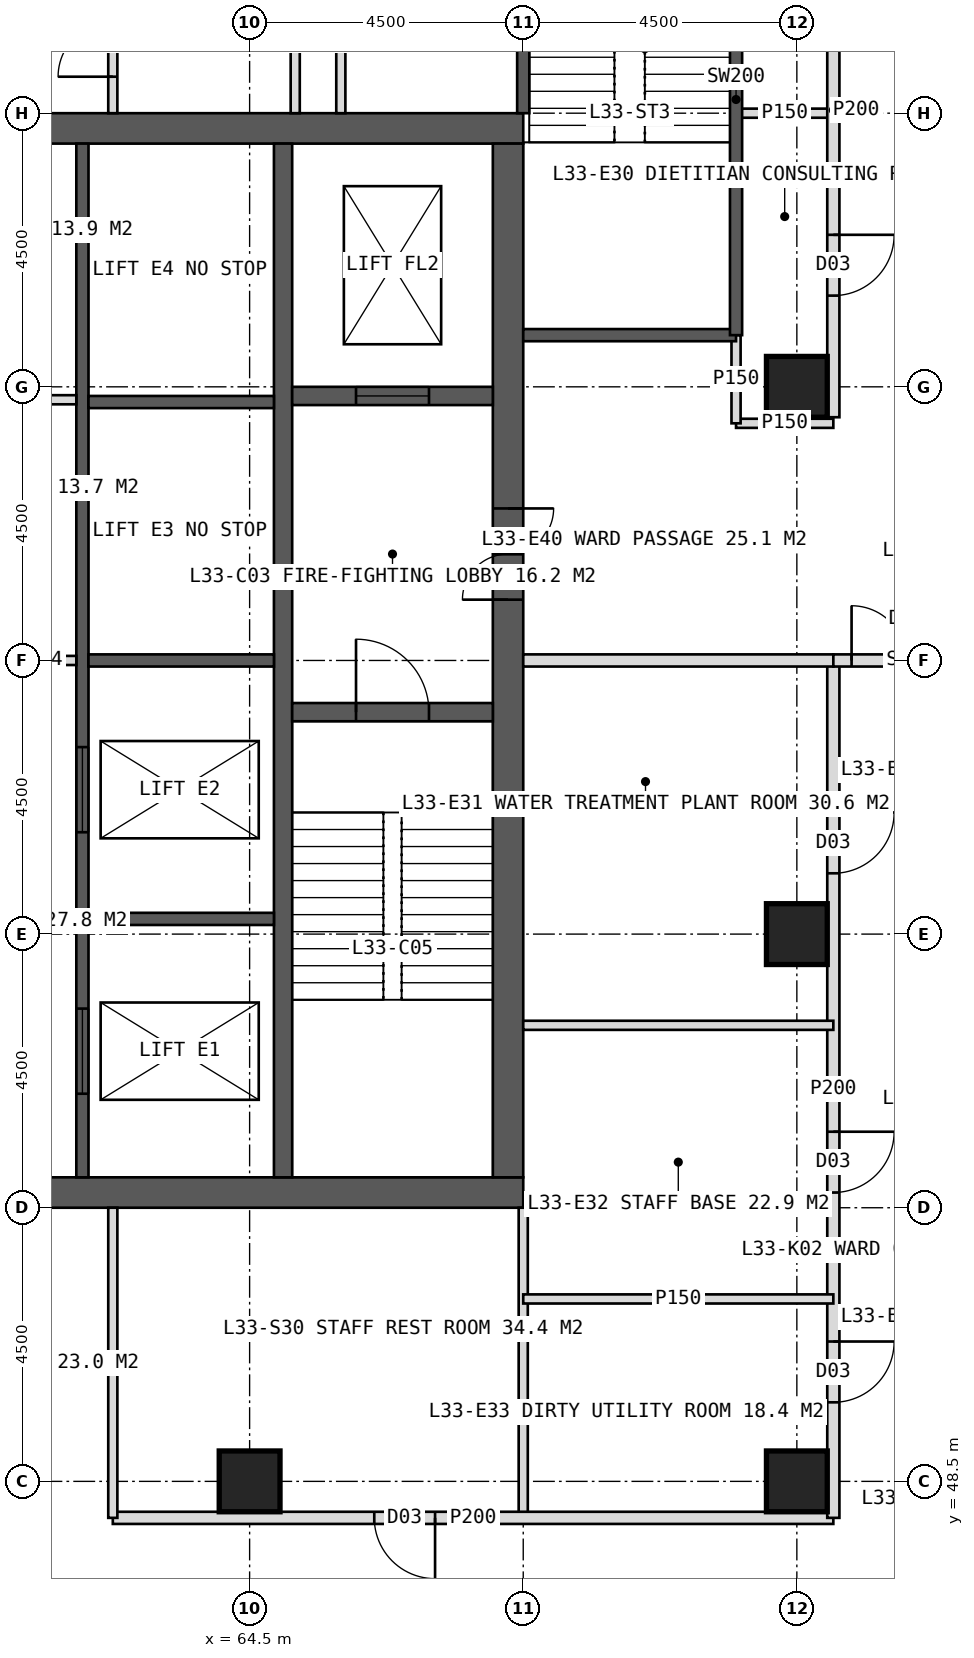
"""IFC4 building model, lengths in metres.
Left out: names, types, materials, properties, quantities, classifications, styles, units other than length and angle.
Written with IfcOpenShell. Run it as: python <this file> out.ifc"""

import sys

from ifc_helpers import new_model, si_unit, direction, frame, frame_2d, origin, origin_2d, place, context, subcontext, project, spatial, rectangle, hollow_rectangle, extrude, element, fill, save


model = new_model("IFC4")
c1 = context("Model", 3, precision=1e-05, world=origin(), true_north=direction((0.0, 1.0)))
c2 = subcontext(c1, "Body", "Model", "MODEL_VIEW")
j1 = project(units=[si_unit("LENGTHUNIT", "METRE"), si_unit("PLANEANGLEUNIT", "RADIAN")], contexts=[c1])
p1 = place(None, origin())
s1 = spatial("IfcSite", under=j1, at=p1, CompositionType="ELEMENT")
p2 = place(p1, origin())
s2 = spatial("IfcBuilding", under=s1, at=p2, CompositionType="ELEMENT")
p3 = place(p2, frame((0.0, 0.0, 140.0)))
s3 = spatial("IfcBuildingStorey", under=s2, at=p3, CompositionType="ELEMENT", Elevation=140.0)
p4 = place(p3, frame((51.0, 70.75, 0.0), z_axis=(0.0, 0.0, 1.0), x_axis=(1.0, 0.0, 0.0)))
e1 = element("IfcWall", 1, at=p4, inside=s3, PredefinedType="SHEAR", context=c2, shape_type="SweptSolid", body=[
    extrude(rectangle(XDim=18.0, YDim=0.5, at=frame_2d((9.0, 0.0))), origin(), (0.0, 0.0, 1.0), 4.0),
])
p5 = place(p4, frame((8.1, 0.0, 0.0)))
e2 = element("IfcOpeningElement", 2, at=p5, cuts=e1, PredefinedType="OPENING", context=c2, shape_type="SweptSolid", body=[
    extrude(rectangle(XDim=1.8, YDim=2.2, at=frame_2d((0.9, 1.1))), frame((0.0, 0.26, 0.0), z_axis=(0.0, -1.0, 0.0), x_axis=(1.0, 0.0, 0.0)), (0.0, 0.0, 1.0), 0.52),
])
p6 = place(p3, frame((51.0, 53.25, 0.0), z_axis=(0.0, 0.0, 1.0), x_axis=(1.0, 0.0, 0.0)))
e3 = element("IfcWall", 3, at=p6, inside=s3, PredefinedType="SHEAR", context=c2, shape_type="SweptSolid", body=[
    extrude(rectangle(XDim=18.0, YDim=0.5, at=frame_2d((9.0, 0.0))), origin(), (0.0, 0.0, 1.0), 4.0),
])
p7 = place(p6, frame((8.1, 0.0, 0.0)))
e4 = element("IfcOpeningElement", 4, at=p7, cuts=e3, PredefinedType="OPENING", context=c2, shape_type="SweptSolid", body=[
    extrude(rectangle(XDim=1.8, YDim=2.2, at=frame_2d((0.9, 1.1))), frame((0.0, 0.26, 0.0), z_axis=(0.0, -1.0, 0.0), x_axis=(1.0, 0.0, 0.0)), (0.0, 0.0, 1.0), 0.52),
])
p8 = place(p3, frame((68.75, 53.5, 0.0), z_axis=(0.0, 0.0, 1.0), x_axis=(0.0, 1.0, 0.0)))
e5 = element("IfcWall", 5, at=p8, inside=s3, PredefinedType="SHEAR", context=c2, shape_type="SweptSolid", body=[
    extrude(rectangle(XDim=17.0, YDim=0.5, at=frame_2d((8.5, 0.0))), origin(), (0.0, 0.0, 1.0), 4.0),
])
p9 = place(p8, frame((9.5, 0.0, 0.0)))
e6 = element("IfcOpeningElement", 6, at=p9, cuts=e5, PredefinedType="OPENING", context=c2, shape_type="SweptSolid", body=[
    extrude(rectangle(XDim=1.5, YDim=2.2, at=frame_2d((0.75, 1.1))), frame((0.0, 0.26, 0.0), z_axis=(0.0, -1.0, 0.0), x_axis=(1.0, 0.0, 0.0)), (0.0, 0.0, 1.0), 0.52),
])
p10 = place(p3, frame((65.05, 53.5, 0.0), z_axis=(0.0, 0.0, 1.0), x_axis=(0.0, 1.0, 0.0)))
e7 = element("IfcWall", 7, at=p10, inside=s3, PredefinedType="SHEAR", context=c2, shape_type="SweptSolid", body=[
    extrude(rectangle(XDim=17.0, YDim=0.3, at=frame_2d((8.5, 0.0))), origin(), (0.0, 0.0, 1.0), 4.0),
])
p11 = place(p3, frame((61.75, 53.5, 0.0), z_axis=(0.0, 0.0, 1.0), x_axis=(0.0, 1.0, 0.0)))
e8 = element("IfcWall", 8, at=p11, inside=s3, PredefinedType="SHEAR", context=c2, shape_type="SweptSolid", body=[
    extrude(rectangle(XDim=17.0, YDim=0.2, at=frame_2d((8.5, 0.0))), origin(), (0.0, 0.0, 1.0), 4.0),
])
p12 = place(p11, frame((1.375, 0.0, 0.0)))
e9 = element("IfcOpeningElement", 9, at=p12, cuts=e8, PredefinedType="OPENING", context=c2, shape_type="SweptSolid", body=[
    extrude(rectangle(XDim=1.4, YDim=2.2, at=frame_2d((0.7, 1.1))), frame((0.0, 0.11, 0.0), z_axis=(0.0, -1.0, 0.0), x_axis=(1.0, 0.0, 0.0)), (0.0, 0.0, 1.0), 0.22),
])
p13 = place(p11, frame((5.675, 0.0, 0.0)))
e10 = element("IfcOpeningElement", 10, at=p13, cuts=e8, PredefinedType="OPENING", context=c2, shape_type="SweptSolid", body=[
    extrude(rectangle(XDim=1.4, YDim=2.2, at=frame_2d((0.7, 1.1))), frame((0.0, 0.11, 0.0), z_axis=(0.0, -1.0, 0.0), x_axis=(1.0, 0.0, 0.0)), (0.0, 0.0, 1.0), 0.22),
])
for number, where, z_axis, x_axis in (
    (11, (61.85, 57.75, 0.0), (0.0, 0.0, 1.0), (1.0, 0.0, 0.0)),
    (12, (61.85, 62.0, 0.0), (0.0, 0.0, 1.0), (1.0, 0.0, 0.0)),
    (13, (61.85, 66.25, 0.0), (0.0, 0.0, 1.0), (1.0, 0.0, 0.0)),
):
    element("IfcWall", number, at=place(p3, frame(where, z_axis=z_axis, x_axis=x_axis)), inside=s3, PredefinedType="SHEAR", context=c2, shape_type="SweptSolid", body=[
        extrude(rectangle(XDim=3.05, YDim=0.2, at=frame_2d((1.525, 0.0))), origin(), (0.0, 0.0, 1.0), 4.0),
    ])
p14 = place(p3, frame((65.2, 61.15, 0.0), z_axis=(0.0, 0.0, 1.0), x_axis=(1.0, 0.0, 0.0)))
e14 = element("IfcWall", 14, at=p14, inside=s3, PredefinedType="SHEAR", context=c2, shape_type="SweptSolid", body=[
    extrude(rectangle(XDim=3.3, YDim=0.3, at=frame_2d((1.65, 0.0))), origin(), (0.0, 0.0, 1.0), 4.0),
])
p15 = place(p14, frame((1.05, 0.0, 0.0)))
e15 = element("IfcOpeningElement", 15, at=p15, cuts=e14, PredefinedType="OPENING", context=c2, shape_type="SweptSolid", body=[
    extrude(rectangle(XDim=1.2, YDim=2.1, at=frame_2d((0.6, 1.05))), frame((0.0, 0.16, 0.0), z_axis=(0.0, -1.0, 0.0), x_axis=(1.0, 0.0, 0.0)), (0.0, 0.0, 1.0), 0.32),
])
p16 = place(p3, frame((65.2, 66.35, 0.0), z_axis=(0.0, 0.0, 1.0), x_axis=(1.0, 0.0, 0.0)))
e16 = element("IfcWall", 16, at=p16, inside=s3, PredefinedType="SHEAR", context=c2, shape_type="SweptSolid", body=[
    extrude(rectangle(XDim=3.3, YDim=0.3, at=frame_2d((1.65, 0.0))), origin(), (0.0, 0.0, 1.0), 4.0),
])
p17 = place(p16, frame((1.05, 0.0, 0.0)))
e17 = element("IfcOpeningElement", 17, at=p17, cuts=e16, PredefinedType="OPENING", context=c2, shape_type="SweptSolid", body=[
    extrude(rectangle(XDim=1.2, YDim=2.2, at=frame_2d((0.6, 1.1))), frame((0.0, 0.16, 0.0), z_axis=(0.0, -1.0, 0.0), x_axis=(1.0, 0.0, 0.0)), (0.0, 0.0, 1.0), 0.32),
])
for number, where, z_axis, x_axis in (
    (18, (73.5, 48.5, 0.0), (0.0, 0.0, 1.0), (1.0, 0.0, 0.0)),
    (19, (64.5, 48.5, 0.0), (0.0, 0.0, 1.0), (1.0, 0.0, 0.0)),
    (20, (73.5, 57.5, 0.0), (0.0, 0.0, 1.0), (1.0, 0.0, 0.0)),
    (21, (73.5, 66.5, 0.0), (0.0, 0.0, 1.0), (1.0, 0.0, 0.0)),
):
    element("IfcColumn", number, at=place(p3, frame(where, z_axis=z_axis, x_axis=x_axis)), inside=s3, PredefinedType="COLUMN", context=c2, shape_type="SweptSolid", body=[
        extrude(hollow_rectangle(XDim=1.0, YDim=1.0, WallThickness=0.1, at=origin_2d()), origin(), (0.0, 0.0, 1.0), 4.0),
    ])
p18 = place(p3, frame((62.25, 71.0, 0.0), z_axis=(0.0, 0.0, 1.0), x_axis=(0.0, 1.0, 0.0)))
e22 = element("IfcWall", 22, at=p18, inside=s3, PredefinedType="PARTITIONING", context=c2, shape_type="SweptSolid", body=[
    extrude(rectangle(XDim=5.1, YDim=0.15, at=frame_2d((2.55, 0.0))), origin(), (0.0, 0.0, 1.0), 3.75),
])
p19 = place(p18, frame((0.6, 0.0, 0.0)))
e23 = element("IfcOpeningElement", 23, at=p19, cuts=e22, PredefinedType="OPENING", context=c2, shape_type="SweptSolid", body=[
    extrude(rectangle(XDim=0.9, YDim=2.1, at=frame_2d((0.45, 1.05))), frame((0.0, 0.085, 0.0), z_axis=(0.0, -1.0, 0.0), x_axis=(1.0, 0.0, 0.0)), (0.0, 0.0, 1.0), 0.17),
])
p20 = place(p3, frame((66.0, 71.0, 0.0), z_axis=(0.0, 0.0, 1.0), x_axis=(0.0, 1.0, 0.0)))
e24 = element("IfcWall", 24, at=p20, inside=s3, PredefinedType="PARTITIONING", context=c2, shape_type="SweptSolid", body=[
    extrude(rectangle(XDim=5.1, YDim=0.15, at=frame_2d((2.55, 0.0))), origin(), (0.0, 0.0, 1.0), 3.75),
])
p21 = place(p3, frame((65.25, 71.0, 0.0), z_axis=(0.0, 0.0, 1.0), x_axis=(0.0, 1.0, 0.0)))
e25 = element("IfcWall", 25, at=p21, inside=s3, PredefinedType="PARTITIONING", context=c2, shape_type="SweptSolid", body=[
    extrude(rectangle(XDim=2.4, YDim=0.15, at=frame_2d((1.2, 0.0))), origin(), (0.0, 0.0, 1.0), 3.75),
])
p22 = place(p3, frame((69.0, 53.0, 0.0), z_axis=(0.0, 0.0, 1.0), x_axis=(0.0, -1.0, 0.0)))
e26 = element("IfcWall", 26, at=p22, inside=s3, PredefinedType="PARTITIONING", context=c2, shape_type="SweptSolid", body=[
    extrude(rectangle(XDim=5.1, YDim=0.15, at=frame_2d((2.55, 0.0))), origin(), (0.0, 0.0, 1.0), 3.75),
])
p23 = place(p3, frame((74.1, 47.9, 0.0), z_axis=(0.0, 0.0, 1.0), x_axis=(-1.0, 0.0, 0.0)))
e27 = element("IfcWall", 27, at=p23, inside=s3, PredefinedType="PARTITIONING", context=c2, shape_type="SweptSolid", body=[
    extrude(rectangle(XDim=11.85, YDim=0.2, at=frame_2d((5.925, 0.0))), origin(), (0.0, 0.0, 1.0), 3.75),
])
p24 = place(p23, frame((6.55, 0.0, 0.0)))
e28 = element("IfcOpeningElement", 28, at=p24, cuts=e27, PredefinedType="OPENING", context=c2, shape_type="SweptSolid", body=[
    extrude(rectangle(XDim=1.0, YDim=2.1, at=frame_2d((0.5, 1.05))), frame((0.0, 0.11, 0.0), z_axis=(0.0, -1.0, 0.0), x_axis=(1.0, 0.0, 0.0)), (0.0, 0.0, 1.0), 0.22),
])
p25 = place(p3, frame((62.25, 53.0, 0.0), z_axis=(0.0, 0.0, 1.0), x_axis=(0.0, -1.0, 0.0)))
e29 = element("IfcWall", 29, at=p25, inside=s3, PredefinedType="PARTITIONING", context=c2, shape_type="SweptSolid", body=[
    extrude(rectangle(XDim=5.1, YDim=0.15, at=frame_2d((2.55, 0.0))), origin(), (0.0, 0.0, 1.0), 3.75),
])
p26 = place(p3, frame((72.5, 71.0, 0.0), z_axis=(0.0, 0.0, 1.0), x_axis=(1.0, 0.0, 0.0)))
e30 = element("IfcWall", 30, at=p26, inside=s3, PredefinedType="PARTITIONING", context=c2, shape_type="SweptSolid", body=[
    extrude(rectangle(XDim=1.6, YDim=0.15, at=frame_2d((0.8, 0.0))), origin(), (0.0, 0.0, 1.0), 3.75),
])
p27 = place(p3, frame((74.1, 76.1, 0.0), z_axis=(0.0, 0.0, 1.0), x_axis=(0.0, -1.0, 0.0)))
e31 = element("IfcWall", 31, at=p27, inside=s3, PredefinedType="PARTITIONING", context=c2, shape_type="SweptSolid", body=[
    extrude(rectangle(XDim=10.1, YDim=0.2, at=frame_2d((5.05, 0.0))), origin(), (0.0, 0.0, 1.0), 3.75),
])
p28 = place(p27, frame((1.2, 0.0, 0.0)))
e32 = element("IfcOpeningElement", 32, at=p28, cuts=e31, PredefinedType="OPENING", context=c2, shape_type="SweptSolid", body=[
    extrude(rectangle(XDim=1.0, YDim=2.1, at=frame_2d((0.5, 1.05))), frame((0.0, 0.11, 0.0), z_axis=(0.0, -1.0, 0.0), x_axis=(1.0, 0.0, 0.0)), (0.0, 0.0, 1.0), 0.22),
])
p29 = place(p27, frame((7.1, 0.0, 0.0)))
e33 = element("IfcOpeningElement", 33, at=p29, cuts=e31, PredefinedType="OPENING", context=c2, shape_type="SweptSolid", body=[
    extrude(rectangle(XDim=1.0, YDim=2.1, at=frame_2d((0.5, 1.05))), frame((0.0, 0.11, 0.0), z_axis=(0.0, -1.0, 0.0), x_axis=(1.0, 0.0, 0.0)), (0.0, 0.0, 1.0), 0.22),
])
p30 = place(p3, frame((74.1, 62.0, 0.0), z_axis=(0.0, 0.0, 1.0), x_axis=(0.0, -1.0, 0.0)))
e34 = element("IfcWall", 34, at=p30, inside=s3, PredefinedType="PARTITIONING", context=c2, shape_type="SweptSolid", body=[
    extrude(rectangle(XDim=14.1, YDim=0.2, at=frame_2d((7.05, 0.0))), origin(), (0.0, 0.0, 1.0), 3.75),
])
p31 = place(p30, frame((2.5, 0.0, 0.0)))
e35 = element("IfcOpeningElement", 35, at=p31, cuts=e34, PredefinedType="OPENING", context=c2, shape_type="SweptSolid", body=[
    extrude(rectangle(XDim=1.0, YDim=2.1, at=frame_2d((0.5, 1.05))), frame((0.0, 0.11, 0.0), z_axis=(0.0, -1.0, 0.0), x_axis=(1.0, 0.0, 0.0)), (0.0, 0.0, 1.0), 0.22),
])
p32 = place(p30, frame((7.75, 0.0, 0.0)))
e36 = element("IfcOpeningElement", 36, at=p32, cuts=e34, PredefinedType="OPENING", context=c2, shape_type="SweptSolid", body=[
    extrude(rectangle(XDim=1.0, YDim=2.1, at=frame_2d((0.5, 1.05))), frame((0.0, 0.11, 0.0), z_axis=(0.0, -1.0, 0.0), x_axis=(1.0, 0.0, 0.0)), (0.0, 0.0, 1.0), 0.22),
])
p33 = place(p30, frame((11.2, 0.0, 0.0)))
e37 = element("IfcOpeningElement", 37, at=p33, cuts=e34, PredefinedType="OPENING", context=c2, shape_type="SweptSolid", body=[
    extrude(rectangle(XDim=1.0, YDim=2.1, at=frame_2d((0.5, 1.05))), frame((0.0, 0.11, 0.0), z_axis=(0.0, -1.0, 0.0), x_axis=(1.0, 0.0, 0.0)), (0.0, 0.0, 1.0), 0.22),
])
p34 = place(p3, frame((72.5, 65.9, 0.0), z_axis=(0.0, 0.0, 1.0), x_axis=(1.0, 0.0, 0.0)))
e38 = element("IfcWall", 38, at=p34, inside=s3, PredefinedType="PARTITIONING", context=c2, shape_type="SweptSolid", body=[
    extrude(rectangle(XDim=1.6, YDim=0.15, at=frame_2d((0.8, 0.0))), origin(), (0.0, 0.0, 1.0), 3.75),
])
p35 = place(p3, frame((69.0, 62.0, 0.0), z_axis=(0.0, 0.0, 1.0), x_axis=(1.0, 0.0, 0.0)))
e39 = element("IfcWall", 39, at=p35, inside=s3, PredefinedType="SOLIDWALL", context=c2, shape_type="SweptSolid", body=[
    extrude(rectangle(XDim=5.1, YDim=0.2, at=frame_2d((2.55, 0.0))), origin(), (0.0, 0.0, 1.0), 2.95),
])
for number, where, z_axis, x_axis in (
    (40, (69.0, 56.0, 0.0), (0.0, 0.0, 1.0), (1.0, 0.0, 0.0)),
    (41, (69.0, 51.5, 0.0), (0.0, 0.0, 1.0), (1.0, 0.0, 0.0)),
):
    element("IfcWall", number, at=place(p3, frame(where, z_axis=z_axis, x_axis=x_axis)), inside=s3, PredefinedType="PARTITIONING", context=c2, shape_type="SweptSolid", body=[
        extrude(rectangle(XDim=5.1, YDim=0.15, at=frame_2d((2.55, 0.0))), origin(), (0.0, 0.0, 1.0), 3.75),
    ])
p36 = place(p3, frame((74.1, 62.0, 0.0), z_axis=(0.0, 0.0, 1.0), x_axis=(1.0, 0.0, 0.0)))
e42 = element("IfcWall", 42, at=p36, inside=s3, PredefinedType="SOLIDWALL", context=c2, shape_type="SweptSolid", body=[
    extrude(rectangle(XDim=2.7, YDim=0.2, at=frame_2d((1.35, 0.0))), origin(), (0.0, 0.0, 1.0), 2.95),
])
p37 = place(p36, frame((0.3, 0.0, 0.0)))
e43 = element("IfcOpeningElement", 43, at=p37, cuts=e42, PredefinedType="OPENING", context=c2, shape_type="SweptSolid", body=[
    extrude(rectangle(XDim=1.8, YDim=2.2, at=frame_2d((0.9, 1.1))), frame((0.0, 0.11, 0.0), z_axis=(0.0, -1.0, 0.0), x_axis=(1.0, 0.0, 0.0)), (0.0, 0.0, 1.0), 0.22),
])
p38 = place(p3, frame((58.35, 62.0, 0.0), z_axis=(0.0, 0.0, 1.0), x_axis=(1.0, 0.0, 0.0)))
e44 = element("IfcWall", 44, at=p38, inside=s3, PredefinedType="PARTITIONING", context=c2, shape_type="SweptSolid", body=[
    extrude(rectangle(XDim=3.3, YDim=0.15, at=frame_2d((1.65, 0.0))), origin(), (0.0, 0.0, 1.0), 3.75),
])
p39 = place(p38, frame((1.15, 0.0, 0.0)))
e45 = element("IfcOpeningElement", 45, at=p39, cuts=e44, PredefinedType="OPENING", context=c2, shape_type="SweptSolid", body=[
    extrude(rectangle(XDim=1.0, YDim=2.1, at=frame_2d((0.5, 1.05))), frame((0.0, 0.085, 0.0), z_axis=(0.0, -1.0, 0.0), x_axis=(1.0, 0.0, 0.0)), (0.0, 0.0, 1.0), 0.17),
])
p40 = place(p3, frame((58.35, 66.288, 0.0), z_axis=(0.0, 0.0, 1.0), x_axis=(1.0, 0.0, 0.0)))
e46 = element("IfcWall", 46, at=p40, inside=s3, PredefinedType="PARTITIONING", context=c2, shape_type="SweptSolid", body=[
    extrude(rectangle(XDim=3.3, YDim=0.15, at=frame_2d((1.65, 0.0))), origin(), (0.0, 0.0, 1.0), 3.75),
])
p41 = place(p3, frame((72.5, 65.9, 0.0), z_axis=(0.0, 0.0, 1.0), x_axis=(0.0, 1.0, 0.0)))
e47 = element("IfcWall", 47, at=p41, inside=s3, PredefinedType="PARTITIONING", context=c2, shape_type="SweptSolid", body=[
    extrude(rectangle(XDim=1.45, YDim=0.15, at=frame_2d((0.725, 0.0))), origin(), (0.0, 0.0, 1.0), 3.75),
])
p42 = place(p3, frame((69.0, 71.0, 0.0), z_axis=(0.0, 0.0, 1.0), x_axis=(0.0, 1.0, 0.0)))
e48 = element("IfcWall", 48, at=p42, inside=s3, PredefinedType="SOLIDWALL", context=c2, shape_type="SweptSolid", body=[
    extrude(rectangle(XDim=4.1, YDim=0.2, at=frame_2d((2.05, 0.0))), origin(), (0.0, 0.0, 1.0), 3.75),
])
p43 = place(p3, frame((69.0, 67.35, 0.0), z_axis=(0.0, 0.0, 1.0), x_axis=(1.0, 0.0, 0.0)))
e49 = element("IfcWall", 49, at=p43, inside=s3, PredefinedType="SOLIDWALL", context=c2, shape_type="SweptSolid", body=[
    extrude(rectangle(XDim=3.5, YDim=0.2, at=frame_2d((1.75, 0.0))), origin(), (0.0, 0.0, 1.0), 3.75),
])
p44 = place(p3, frame((72.5, 67.35, 0.0), z_axis=(0.0, 0.0, 1.0), x_axis=(0.0, 1.0, 0.0)))
e50 = element("IfcWall", 50, at=p44, inside=s3, PredefinedType="SOLIDWALL", context=c2, shape_type="SweptSolid", body=[
    extrude(rectangle(XDim=7.75, YDim=0.2, at=frame_2d((3.875, 0.0))), origin(), (0.0, 0.0, 1.0), 3.75),
])
p45 = place(p19, origin())
e51 = element("IfcDoor", 51, at=p45, inside=s3, OperationType="SINGLE_SWING_LEFT", PredefinedType="DOOR", context=c2, shape_type="SweptSolid", body=[
    extrude(rectangle(XDim=0.9, YDim=2.1, at=frame_2d((0.45, 1.05))), frame((0.0, 0.025, 0.0), z_axis=(0.0, -1.0, 0.0), x_axis=(1.0, 0.0, 0.0)), (0.0, 0.0, 1.0), 0.05),
])
fill(e23, e51)
p46 = place(p24, origin())
e52 = element("IfcDoor", 52, at=p46, inside=s3, OperationType="SINGLE_SWING_LEFT", PredefinedType="DOOR", context=c2, shape_type="SweptSolid", body=[
    extrude(rectangle(XDim=1.0, YDim=2.1, at=frame_2d((0.5, 1.05))), frame((0.0, 0.025, 0.0), z_axis=(0.0, -1.0, 0.0), x_axis=(1.0, 0.0, 0.0)), (0.0, 0.0, 1.0), 0.05),
])
fill(e28, e52)
p47 = place(p29, origin())
e53 = element("IfcDoor", 53, at=p47, inside=s3, OperationType="SINGLE_SWING_LEFT", PredefinedType="DOOR", context=c2, shape_type="SweptSolid", body=[
    extrude(rectangle(XDim=1.0, YDim=2.1, at=frame_2d((0.5, 1.05))), frame((0.0, 0.025, 0.0), z_axis=(0.0, -1.0, 0.0), x_axis=(1.0, 0.0, 0.0)), (0.0, 0.0, 1.0), 0.05),
])
fill(e33, e53)
p48 = place(p31, origin())
e54 = element("IfcDoor", 54, at=p48, inside=s3, OperationType="SINGLE_SWING_LEFT", PredefinedType="DOOR", context=c2, shape_type="SweptSolid", body=[
    extrude(rectangle(XDim=1.0, YDim=2.1, at=frame_2d((0.5, 1.05))), frame((0.0, 0.025, 0.0), z_axis=(0.0, -1.0, 0.0), x_axis=(1.0, 0.0, 0.0)), (0.0, 0.0, 1.0), 0.05),
])
fill(e35, e54)
p49 = place(p32, origin())
e55 = element("IfcDoor", 55, at=p49, inside=s3, OperationType="SINGLE_SWING_LEFT", PredefinedType="DOOR", context=c2, shape_type="SweptSolid", body=[
    extrude(rectangle(XDim=1.0, YDim=2.1, at=frame_2d((0.5, 1.05))), frame((0.0, 0.025, 0.0), z_axis=(0.0, -1.0, 0.0), x_axis=(1.0, 0.0, 0.0)), (0.0, 0.0, 1.0), 0.05),
])
fill(e36, e55)
p50 = place(p33, origin())
e56 = element("IfcDoor", 56, at=p50, inside=s3, OperationType="SINGLE_SWING_LEFT", PredefinedType="DOOR", context=c2, shape_type="SweptSolid", body=[
    extrude(rectangle(XDim=1.0, YDim=2.1, at=frame_2d((0.5, 1.05))), frame((0.0, 0.025, 0.0), z_axis=(0.0, -1.0, 0.0), x_axis=(1.0, 0.0, 0.0)), (0.0, 0.0, 1.0), 0.05),
])
fill(e37, e56)
p51 = place(p37, origin())
e57 = element("IfcDoor", 57, at=p51, inside=s3, OperationType="DOUBLE_DOOR_DOUBLE_SWING", PredefinedType="DOOR", context=c2, shape_type="SweptSolid", body=[
    extrude(rectangle(XDim=1.8, YDim=2.2, at=frame_2d((0.9, 1.1))), frame((0.0, 0.025, 0.0), z_axis=(0.0, -1.0, 0.0), x_axis=(1.0, 0.0, 0.0)), (0.0, 0.0, 1.0), 0.05),
])
fill(e43, e57)
p52 = place(p9, origin())
e58 = element("IfcDoor", 58, at=p52, inside=s3, OperationType="DOUBLE_DOOR_SINGLE_SWING", PredefinedType="DOOR", context=c2, shape_type="SweptSolid", body=[
    extrude(rectangle(XDim=1.5, YDim=2.2, at=frame_2d((0.75, 1.1))), frame((0.0, 0.025, 0.0), z_axis=(0.0, -1.0, 0.0), x_axis=(1.0, 0.0, 0.0)), (0.0, 0.0, 1.0), 0.05),
])
fill(e6, e58)
p53 = place(p15, origin())
e59 = element("IfcDoor", 59, at=p53, inside=s3, OperationType="SINGLE_SWING_LEFT", PredefinedType="DOOR", context=c2, shape_type="SweptSolid", body=[
    extrude(rectangle(XDim=1.2, YDim=2.1, at=frame_2d((0.6, 1.05))), frame((0.0, 0.025, 0.0), z_axis=(0.0, -1.0, 0.0), x_axis=(1.0, 0.0, 0.0)), (0.0, 0.0, 1.0), 0.05),
])
fill(e15, e59)
p54 = place(p17, origin())
e60 = element("IfcDoor", 60, at=p54, inside=s3, OperationType="SLIDING_TO_LEFT", PredefinedType="DOOR", context=c2, shape_type="SweptSolid", body=[
    extrude(rectangle(XDim=1.2, YDim=2.2, at=frame_2d((0.6, 1.1))), frame((0.0, 0.025, 0.0), z_axis=(0.0, -1.0, 0.0), x_axis=(1.0, 0.0, 0.0)), (0.0, 0.0, 1.0), 0.05),
])
fill(e17, e60)
p55 = place(p12, origin())
e61 = element("IfcDoor", 61, at=p55, inside=s3, OperationType="SLIDING_TO_LEFT", PredefinedType="DOOR", context=c2, shape_type="SweptSolid", body=[
    extrude(rectangle(XDim=1.4, YDim=2.2, at=frame_2d((0.7, 1.1))), frame((0.0, 0.025, 0.0), z_axis=(0.0, -1.0, 0.0), x_axis=(1.0, 0.0, 0.0)), (0.0, 0.0, 1.0), 0.05),
])
fill(e9, e61)
p56 = place(p13, origin())
e62 = element("IfcDoor", 62, at=p56, inside=s3, OperationType="SLIDING_TO_LEFT", PredefinedType="DOOR", context=c2, shape_type="SweptSolid", body=[
    extrude(rectangle(XDim=1.4, YDim=2.2, at=frame_2d((0.7, 1.1))), frame((0.0, 0.025, 0.0), z_axis=(0.0, -1.0, 0.0), x_axis=(1.0, 0.0, 0.0)), (0.0, 0.0, 1.0), 0.05),
])
fill(e10, e62)
save(model, sys.argv[1])
